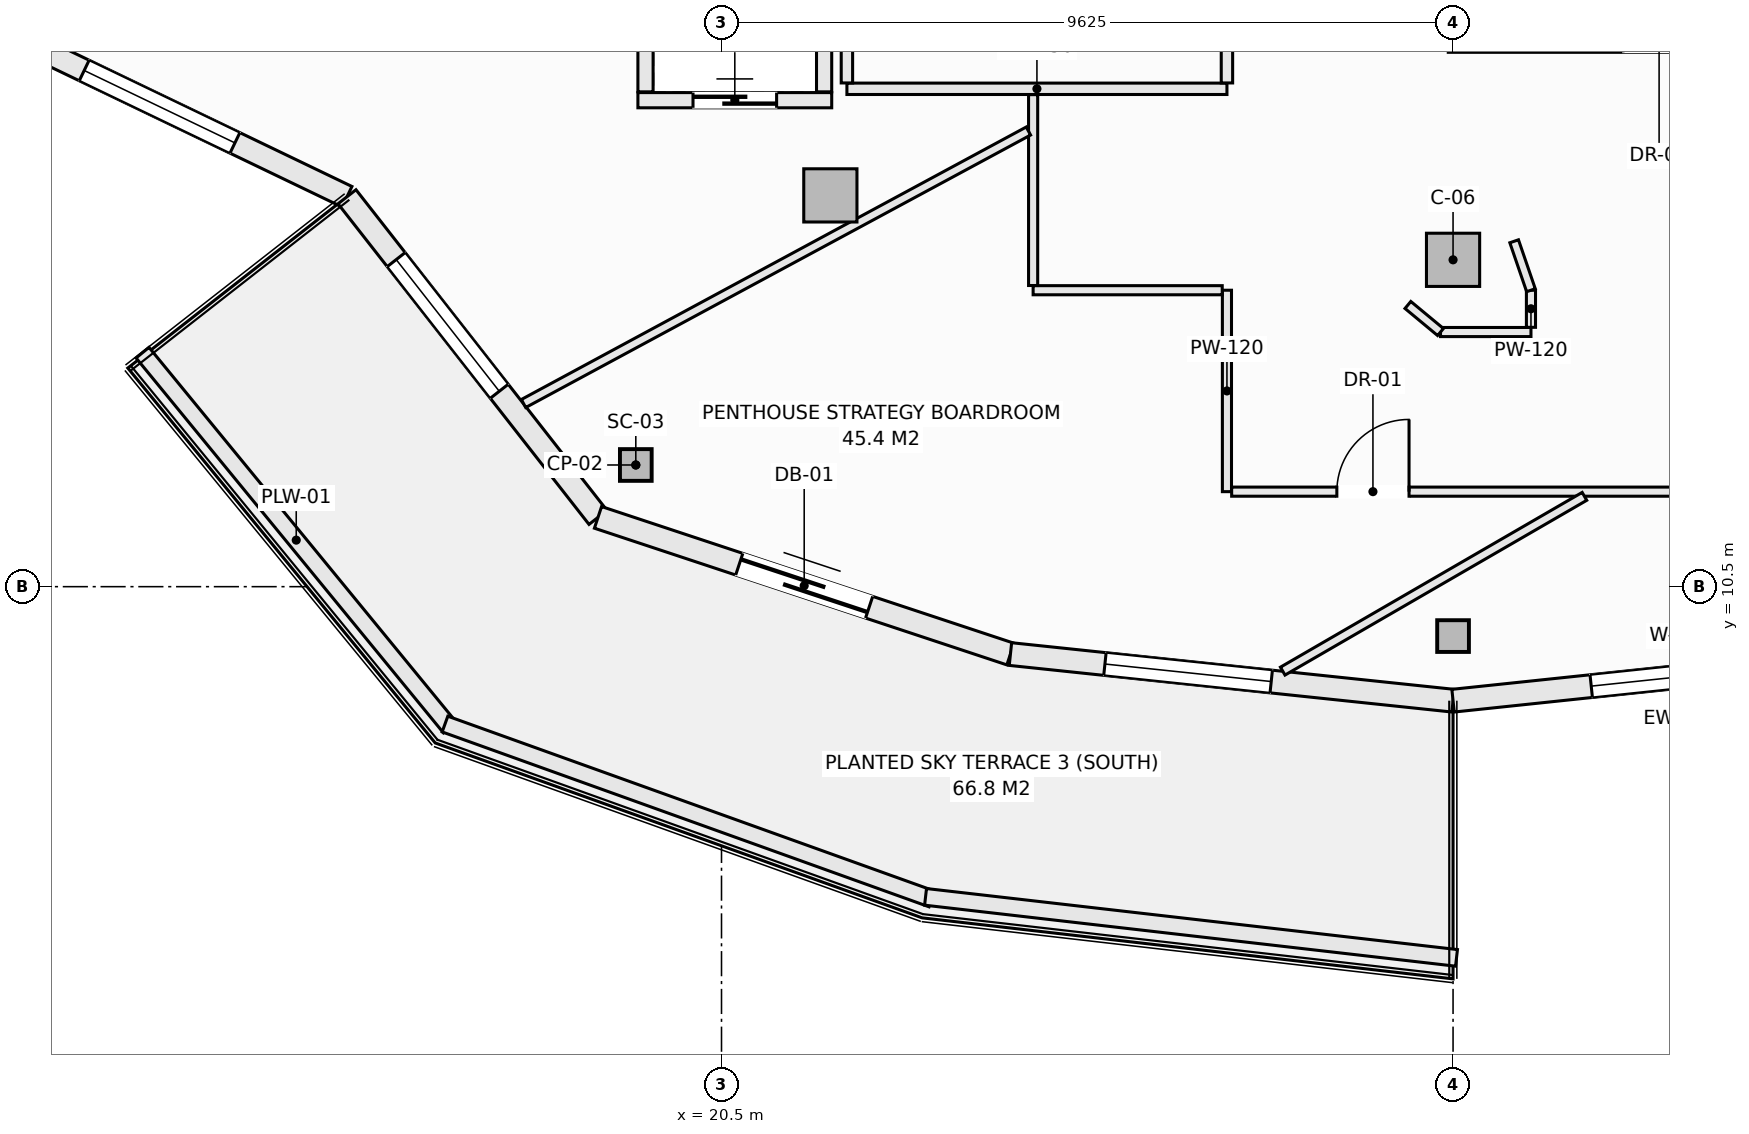
"""IFC4 building model, lengths in metres.
Left out: names, types, materials, properties, quantities, classifications, styles, units other than length and angle.
Written with IfcOpenShell. Run it as: python <this file> out.ifc"""

import sys

from ifc_helpers import new_model, si_unit, direction, frame, frame_2d, origin, origin_2d, place, context, subcontext, project, spatial, rectangle, hollow_rectangle, extrude, element, fill, save


model = new_model("IFC4")
c1 = context("Model", 3, precision=1e-05, world=origin(), true_north=direction((0.0, 1.0)))
c2 = subcontext(c1, "Body", "Model", "MODEL_VIEW")
j1 = project(units=[si_unit("LENGTHUNIT", "METRE"), si_unit("PLANEANGLEUNIT", "RADIAN")], contexts=[c1])
p1 = place(None, origin())
s1 = spatial("IfcSite", under=j1, at=p1, CompositionType="ELEMENT")
p2 = place(p1, origin())
s2 = spatial("IfcBuilding", under=s1, at=p2, CompositionType="ELEMENT")
p3 = place(p2, frame((0.0, 0.0, 255.8)))
s3 = spatial("IfcBuildingStorey", under=s2, at=p3, CompositionType="ELEMENT", Elevation=255.8)
for number, where, z_axis, x_axis in (
    (1, (19.372, 12.101, -0.27), (0.0, 0.0, 1.0), (1.0, 0.0, 0.0)),
    (2, (30.125, 9.85, -0.27), (0.0, 0.0, 1.0), (1.0, 0.0, 0.0)),
):
    element("IfcColumn", number, at=place(p3, frame(where, z_axis=z_axis, x_axis=x_axis)), inside=s3, PredefinedType="COLUMN", context=c2, shape_type="SweptSolid", body=[
        extrude(hollow_rectangle(XDim=0.406, YDim=0.406, WallThickness=0.016, at=origin_2d()), origin(), (0.0, 0.0, 1.0), 3.3),
    ])
for number, where, z_axis, x_axis in (
    (3, (21.932, 15.648, -0.27), (0.0, 0.0, 1.0), (1.0, 0.0, 0.0)),
    (4, (30.125, 14.8, -0.27), (0.0, 0.0, 1.0), (1.0, 0.0, 0.0)),
):
    element("IfcColumn", number, at=place(p3, frame(where, z_axis=z_axis, x_axis=x_axis)), inside=s3, PredefinedType="COLUMN", context=c2, shape_type="SweptSolid", body=[
        extrude(rectangle(XDim=0.7, YDim=0.7, at=origin_2d()), origin(), (0.0, 0.0, 1.0), 3.3),
    ])
p4 = place(p3, frame((10.639, 18.0, 0.0), z_axis=(0.0, 0.0, 1.0), x_axis=(0.901355238351, -0.433080517106, 0.0)))
e5 = element("IfcWall", 5, at=p4, inside=s3, PredefinedType="SOLIDWALL", context=c2, shape_type="SweptSolid", body=[
    extrude(rectangle(XDim=5.473, YDim=0.3, at=frame_2d((2.737, 0.0))), origin(), (0.0, 0.0, 1.0), 2.605),
])
p5 = place(p4, frame((1.637, 0.0, 0.72)))
e6 = element("IfcOpeningElement", 6, at=p5, cuts=e5, PredefinedType="OPENING", context=c2, shape_type="SweptSolid", body=[
    extrude(rectangle(XDim=2.2, YDim=1.65, at=frame_2d((1.1, 0.825))), frame((0.0, 0.16, 0.0), z_axis=(0.0, -1.0, 0.0), x_axis=(1.0, 0.0, 0.0)), (0.0, 0.0, 1.0), 0.32),
])
p6 = place(p3, frame((15.573, 15.63, 0.0), z_axis=(0.0, 0.0, 1.0), x_axis=(0.61644588519, -0.787397276241, 0.0)))
e7 = element("IfcWall", 7, at=p6, inside=s3, PredefinedType="SOLIDWALL", context=c2, shape_type="SweptSolid", body=[
    extrude(rectangle(XDim=5.357, YDim=0.3, at=frame_2d((2.678, 0.0))), origin(), (0.0, 0.0, 1.0), 2.605),
])
p7 = place(p6, frame((1.05, 0.0, 0.72)))
e8 = element("IfcOpeningElement", 8, at=p7, cuts=e7, PredefinedType="OPENING", context=c2, shape_type="SweptSolid", body=[
    extrude(rectangle(XDim=2.2, YDim=1.65, at=frame_2d((1.1, 0.825))), frame((0.0, 0.16, 0.0), z_axis=(0.0, -1.0, 0.0), x_axis=(1.0, 0.0, 0.0)), (0.0, 0.0, 1.0), 0.32),
])
p8 = place(p3, frame((18.875, 11.412, 0.0), z_axis=(0.0, 0.0, 1.0), x_axis=(0.949232769585, -0.314574552605, 0.0)))
e9 = element("IfcWall", 9, at=p8, inside=s3, PredefinedType="SOLIDWALL", context=c2, shape_type="SweptSolid", body=[
    extrude(rectangle(XDim=5.717, YDim=0.3, at=frame_2d((2.858, 0.0))), origin(), (0.0, 0.0, 1.0), 2.605),
])
p9 = place(p8, frame((1.958, 0.0, 0.0)))
e10 = element("IfcOpeningElement", 10, at=p9, cuts=e9, PredefinedType="OPENING", context=c2, shape_type="SweptSolid", body=[
    extrude(rectangle(XDim=1.8, YDim=2.25, at=frame_2d((0.9, 1.125))), frame((0.0, 0.16, 0.0), z_axis=(0.0, -1.0, 0.0), x_axis=(1.0, 0.0, 0.0)), (0.0, 0.0, 1.0), 0.32),
])
p10 = place(p3, frame((24.302, 9.613, 0.0), z_axis=(0.0, 0.0, 1.0), x_axis=(0.994500425783, -0.10473253132, 0.0)))
e11 = element("IfcWall", 11, at=p10, inside=s3, PredefinedType="SOLIDWALL", context=c2, shape_type="SweptSolid", body=[
    extrude(rectangle(XDim=5.856, YDim=0.3, at=frame_2d((2.928, 0.0))), origin(), (0.0, 0.0, 1.0), 2.605),
])
p11 = place(p10, frame((1.25, 0.0, 0.72)))
e12 = element("IfcOpeningElement", 12, at=p11, cuts=e11, PredefinedType="OPENING", context=c2, shape_type="SweptSolid", body=[
    extrude(rectangle(XDim=2.2, YDim=1.65, at=frame_2d((1.1, 0.825))), frame((0.0, 0.16, 0.0), z_axis=(0.0, -1.0, 0.0), x_axis=(1.0, 0.0, 0.0)), (0.0, 0.0, 1.0), 0.32),
])
p12 = place(p3, frame((30.125, 9.0, 0.0), z_axis=(0.0, 0.0, 1.0), x_axis=(0.994500425783, 0.10473253132, 0.0)))
e13 = element("IfcWall", 13, at=p12, inside=s3, PredefinedType="SOLIDWALL", context=c2, shape_type="SweptSolid", body=[
    extrude(rectangle(XDim=5.856, YDim=0.3, at=frame_2d((2.928, 0.0))), origin(), (0.0, 0.0, 1.0), 2.605),
])
p13 = place(p12, frame((1.828, 0.0, 0.72)))
e14 = element("IfcOpeningElement", 14, at=p13, cuts=e13, PredefinedType="OPENING", context=c2, shape_type="SweptSolid", body=[
    extrude(rectangle(XDim=2.2, YDim=1.65, at=frame_2d((1.1, 0.825))), frame((0.0, 0.16, 0.0), z_axis=(0.0, -1.0, 0.0), x_axis=(1.0, 0.0, 0.0)), (0.0, 0.0, 1.0), 0.32),
])
p14 = place(p3, frame((12.882, 13.579, 0.0), z_axis=(0.0, 0.0, 1.0), x_axis=(0.63407318032, -0.77327304492, 0.0)))
e15 = element("IfcWall", 15, at=p14, inside=s3, PredefinedType="PARAPET", context=c2, shape_type="SweptSolid", body=[
    extrude(rectangle(XDim=6.379, YDim=0.22, at=frame_2d((3.189, 0.0))), origin(), (0.0, 0.0, 1.0), 0.52),
])
p15 = place(p3, frame((16.862, 8.692, 0.0), z_axis=(0.0, 0.0, 1.0), x_axis=(0.941139090914, -0.338019543152, 0.0)))
e16 = element("IfcWall", 16, at=p15, inside=s3, PredefinedType="PARAPET", context=c2, shape_type="SweptSolid", body=[
    extrude(rectangle(XDim=6.807, YDim=0.22, at=frame_2d((3.403, 0.0))), origin(), (0.0, 0.0, 1.0), 0.52),
])
p16 = place(p3, frame((23.185, 6.419, 0.0), z_axis=(0.0, 0.0, 1.0), x_axis=(0.993458716016, -0.114191854231, 0.0)))
e17 = element("IfcWall", 17, at=p16, inside=s3, PredefinedType="PARAPET", context=c2, shape_type="SweptSolid", body=[
    extrude(rectangle(XDim=7.032, YDim=0.22, at=frame_2d((3.516, 0.0))), origin(), (0.0, 0.0, 1.0), 0.52),
])
p17 = place(p3, frame((19.4, 16.9, 0.0), z_axis=(0.0, 0.0, 1.0), x_axis=(1.0, 0.0, 0.0)))
e18 = element("IfcWall", 18, at=p17, inside=s3, PredefinedType="SOLIDWALL", context=c2, shape_type="SweptSolid", body=[
    extrude(rectangle(XDim=2.55, YDim=0.2, at=frame_2d((1.275, 0.0))), origin(), (0.0, 0.0, 1.0), 3.03),
])
p18 = place(p17, frame((0.725, 0.0, 0.0)))
e19 = element("IfcOpeningElement", 19, at=p18, cuts=e18, PredefinedType="OPENING", context=c2, shape_type="SweptSolid", body=[
    extrude(rectangle(XDim=1.1, YDim=2.2, at=frame_2d((0.55, 1.1))), frame((0.0, 0.11, 0.0), z_axis=(0.0, -1.0, 0.0), x_axis=(1.0, 0.0, 0.0)), (0.0, 0.0, 1.0), 0.22),
])
for number, where, z_axis, x_axis in (
    (20, (19.5, 17.01, 0.0), (0.0, 0.0, 1.0), (0.0, 1.0, 0.0)),
    (21, (21.85, 17.01, 0.0), (0.0, 0.0, 1.0), (0.0, 1.0, 0.0)),
):
    element("IfcWall", number, at=place(p3, frame(where, z_axis=z_axis, x_axis=x_axis)), inside=s3, PredefinedType="SOLIDWALL", context=c2, shape_type="SweptSolid", body=[
        extrude(rectangle(XDim=2.53, YDim=0.2, at=frame_2d((1.265, 0.0))), origin(), (0.0, 0.0, 1.0), 3.03),
    ])
p19 = place(p3, frame((22.15, 17.05, 0.0), z_axis=(0.0, 0.0, 1.0), x_axis=(1.0, 0.0, 0.0)))
e22 = element("IfcWall", 22, at=p19, inside=s3, PredefinedType="PARTITIONING", context=c2, shape_type="SweptSolid", body=[
    extrude(rectangle(XDim=5.0, YDim=0.15, at=frame_2d((2.5, 0.0))), origin(), (0.0, 0.0, 1.0), 3.03),
])
p20 = place(p3, frame((22.15, 17.127, 0.0), z_axis=(0.0, 0.0, 1.0), x_axis=(0.0, 1.0, 0.0)))
e23 = element("IfcWall", 23, at=p20, inside=s3, PredefinedType="PARTITIONING", context=c2, shape_type="SweptSolid", body=[
    extrude(rectangle(XDim=2.823, YDim=0.15, at=frame_2d((1.412, 0.0))), origin(), (0.0, 0.0, 1.0), 3.03),
])
p21 = place(p3, frame((27.15, 11.75, 0.0), z_axis=(0.0, 0.0, 1.0), x_axis=(0.0, 1.0, 0.0)))
e24 = element("IfcWall", 24, at=p21, inside=s3, PredefinedType="PARTITIONING", context=c2, shape_type="SweptSolid", body=[
    extrude(rectangle(XDim=2.65, YDim=0.12, at=frame_2d((1.325, 0.0))), origin(), (0.0, 0.0, 1.0), 3.03),
])
p22 = place(p3, frame((27.15, 17.127, 0.0), z_axis=(0.0, 0.0, 1.0), x_axis=(0.0, 1.0, 0.0)))
e25 = element("IfcWall", 25, at=p22, inside=s3, PredefinedType="PARTITIONING", context=c2, shape_type="SweptSolid", body=[
    extrude(rectangle(XDim=2.871, YDim=0.15, at=frame_2d((1.436, 0.0))), origin(), (0.0, 0.0, 1.0), 3.03),
])
p23 = place(p22, frame((0.96, 0.0, 0.0)))
e26 = element("IfcOpeningElement", 26, at=p23, cuts=e25, PredefinedType="OPENING", context=c2, shape_type="SweptSolid", body=[
    extrude(rectangle(XDim=0.95, YDim=2.1, at=frame_2d((0.475, 1.05))), frame((0.0, 0.085, 0.0), z_axis=(0.0, -1.0, 0.0), x_axis=(1.0, 0.0, 0.0)), (0.0, 0.0, 1.0), 0.17),
])
p24 = place(p3, frame((24.6, 14.4, 0.0), z_axis=(0.0, 0.0, 1.0), x_axis=(1.0, 0.0, 0.0)))
e27 = element("IfcWall", 27, at=p24, inside=s3, PredefinedType="PARTITIONING", context=c2, shape_type="SweptSolid", body=[
    extrude(rectangle(XDim=2.488, YDim=0.12, at=frame_2d((1.244, 0.0))), origin(), (0.0, 0.0, 1.0), 3.03),
])
p25 = place(p3, frame((27.212, 11.75, 0.0), z_axis=(0.0, 0.0, 1.0), x_axis=(1.0, 0.0, 0.0)))
e28 = element("IfcWall", 28, at=p25, inside=s3, PredefinedType="PARTITIONING", context=c2, shape_type="SweptSolid", body=[
    extrude(rectangle(XDim=7.256, YDim=0.12, at=frame_2d((3.628, 0.0))), origin(), (0.0, 0.0, 1.0), 3.03),
])
p26 = place(p25, frame((1.384, 0.0, 0.0)))
e29 = element("IfcOpeningElement", 29, at=p26, cuts=e28, PredefinedType="OPENING", context=c2, shape_type="SweptSolid", body=[
    extrude(rectangle(XDim=0.95, YDim=2.1, at=frame_2d((0.475, 1.05))), frame((0.0, 0.07, 0.0), z_axis=(0.0, -1.0, 0.0), x_axis=(1.0, 0.0, 0.0)), (0.0, 0.0, 1.0), 0.14),
])
p27 = place(p3, frame((24.6, 14.462, 0.0), z_axis=(0.0, 0.0, 1.0), x_axis=(0.0, 1.0, 0.0)))
e30 = element("IfcWall", 30, at=p27, inside=s3, PredefinedType="PARTITIONING", context=c2, shape_type="SweptSolid", body=[
    extrude(rectangle(XDim=2.511, YDim=0.12, at=frame_2d((1.255, 0.0))), origin(), (0.0, 0.0, 1.0), 3.03),
])
p28 = place(p3, frame((29.96, 13.85, 0.0), z_axis=(0.0, 0.0, 1.0), x_axis=(1.0, 0.0, 0.0)))
e31 = element("IfcWall", 31, at=p28, inside=s3, PredefinedType="PARTITIONING", context=c2, shape_type="SweptSolid", body=[
    extrude(rectangle(XDim=1.19, YDim=0.12, at=frame_2d((0.595, 0.0))), origin(), (0.0, 0.0, 1.0), 3.03),
])
p29 = place(p3, frame((31.15, 13.912, 0.0), z_axis=(0.0, 0.0, 1.0), x_axis=(0.0, 1.0, 0.0)))
e32 = element("IfcWall", 32, at=p29, inside=s3, PredefinedType="PARTITIONING", context=c2, shape_type="SweptSolid", body=[
    extrude(rectangle(XDim=0.488, YDim=0.12, at=frame_2d((0.244, 0.0))), origin(), (0.0, 0.0, 1.0), 3.03),
])
p30 = place(p3, frame((30.929, 15.044, 0.0), z_axis=(0.0, 0.0, 1.0), x_axis=(0.324498492416, -0.945886213252, 0.0)))
e33 = element("IfcWall", 33, at=p30, inside=s3, PredefinedType="PARTITIONING", context=c2, shape_type="SweptSolid", body=[
    extrude(rectangle(XDim=0.681, YDim=0.12, at=frame_2d((0.34, 0.0))), origin(), (0.0, 0.0, 1.0), 3.03),
])
p31 = place(p3, frame((29.531, 14.206, 0.0), z_axis=(0.0, 0.0, 1.0), x_axis=(0.7695479554, -0.638589026166, 0.0)))
e34 = element("IfcWall", 34, at=p31, inside=s3, PredefinedType="PARTITIONING", context=c2, shape_type="SweptSolid", body=[
    extrude(rectangle(XDim=0.557, YDim=0.12, at=frame_2d((0.279, 0.0))), origin(), (0.0, 0.0, 1.0), 3.03),
])
p32 = place(p3, frame((17.895, 12.91, 0.0), z_axis=(0.0, 0.0, 1.0), x_axis=(0.880038694226, 0.474901986377, 0.0)))
e35 = element("IfcWall", 35, at=p32, inside=s3, PredefinedType="PARTITIONING", context=c2, shape_type="SweptSolid", body=[
    extrude(rectangle(XDim=7.548, YDim=0.12, at=frame_2d((3.774, 0.0))), origin(), (0.0, 0.0, 1.0), 1.823),
])
p33 = place(p3, frame((27.884, 9.389, 0.0), z_axis=(0.0, 0.0, 1.0), x_axis=(0.865363124713, 0.501145350558, 0.0)))
e36 = element("IfcWall", 36, at=p33, inside=s3, PredefinedType="PARTITIONING", context=c2, shape_type="SweptSolid", body=[
    extrude(rectangle(XDim=4.588, YDim=0.12, at=frame_2d((2.294, 0.0))), origin(), (0.0, 0.0, 1.0), 2.603),
])
p34 = place(p5, origin())
e37 = element("IfcWindow", 37, at=p34, inside=s3, PartitioningType="SINGLE_PANEL", PredefinedType="WINDOW", context=c2, shape_type="SweptSolid", body=[
    extrude(rectangle(XDim=2.2, YDim=1.65, at=frame_2d((1.1, 0.825))), frame((0.0, 0.03, 0.0), z_axis=(0.0, -1.0, 0.0), x_axis=(1.0, 0.0, 0.0)), (0.0, 0.0, 1.0), 0.06),
])
fill(e6, e37)
p35 = place(p7, origin())
e38 = element("IfcWindow", 38, at=p35, inside=s3, PartitioningType="SINGLE_PANEL", PredefinedType="WINDOW", context=c2, shape_type="SweptSolid", body=[
    extrude(rectangle(XDim=2.2, YDim=1.65, at=frame_2d((1.1, 0.825))), frame((0.0, 0.03, 0.0), z_axis=(0.0, -1.0, 0.0), x_axis=(1.0, 0.0, 0.0)), (0.0, 0.0, 1.0), 0.06),
])
fill(e8, e38)
p36 = place(p9, frame((1.8, 0.0, 0.0), z_axis=(0.0, 0.0, 1.0), x_axis=(-1.0, 0.0, 0.0)))
e39 = element("IfcDoor", 39, at=p36, inside=s3, OperationType="SLIDING_TO_LEFT", PredefinedType="DOOR", context=c2, shape_type="SweptSolid", body=[
    extrude(rectangle(XDim=1.8, YDim=2.25, at=frame_2d((0.9, 1.125))), frame((0.0, 0.025, 0.0), z_axis=(0.0, -1.0, 0.0), x_axis=(1.0, 0.0, 0.0)), (0.0, 0.0, 1.0), 0.05),
])
fill(e10, e39)
p37 = place(p11, origin())
e40 = element("IfcWindow", 40, at=p37, inside=s3, PartitioningType="SINGLE_PANEL", PredefinedType="WINDOW", context=c2, shape_type="SweptSolid", body=[
    extrude(rectangle(XDim=2.2, YDim=1.65, at=frame_2d((1.1, 0.825))), frame((0.0, 0.03, 0.0), z_axis=(0.0, -1.0, 0.0), x_axis=(1.0, 0.0, 0.0)), (0.0, 0.0, 1.0), 0.06),
])
fill(e12, e40)
p38 = place(p13, origin())
e41 = element("IfcWindow", 41, at=p38, inside=s3, PartitioningType="SINGLE_PANEL", PredefinedType="WINDOW", context=c2, shape_type="SweptSolid", body=[
    extrude(rectangle(XDim=2.2, YDim=1.65, at=frame_2d((1.1, 0.825))), frame((0.0, 0.03, 0.0), z_axis=(0.0, -1.0, 0.0), x_axis=(1.0, 0.0, 0.0)), (0.0, 0.0, 1.0), 0.06),
])
fill(e14, e41)
p39 = place(p18, origin())
e42 = element("IfcDoor", 42, at=p39, inside=s3, OperationType="SLIDING_TO_LEFT", PredefinedType="DOOR", context=c2, shape_type="SweptSolid", body=[
    extrude(rectangle(XDim=1.1, YDim=2.2, at=frame_2d((0.55, 1.1))), frame((0.0, 0.025, 0.0), z_axis=(0.0, -1.0, 0.0), x_axis=(1.0, 0.0, 0.0)), (0.0, 0.0, 1.0), 0.05),
])
fill(e19, e42)
p40 = place(p26, origin())
e43 = element("IfcDoor", 43, at=p40, inside=s3, OperationType="SINGLE_SWING_RIGHT", PredefinedType="DOOR", context=c2, shape_type="SweptSolid", body=[
    extrude(rectangle(XDim=0.95, YDim=2.1, at=frame_2d((0.475, 1.05))), frame((0.0, 0.025, 0.0), z_axis=(0.0, -1.0, 0.0), x_axis=(1.0, 0.0, 0.0)), (0.0, 0.0, 1.0), 0.05),
])
fill(e29, e43)
save(model, sys.argv[1])
